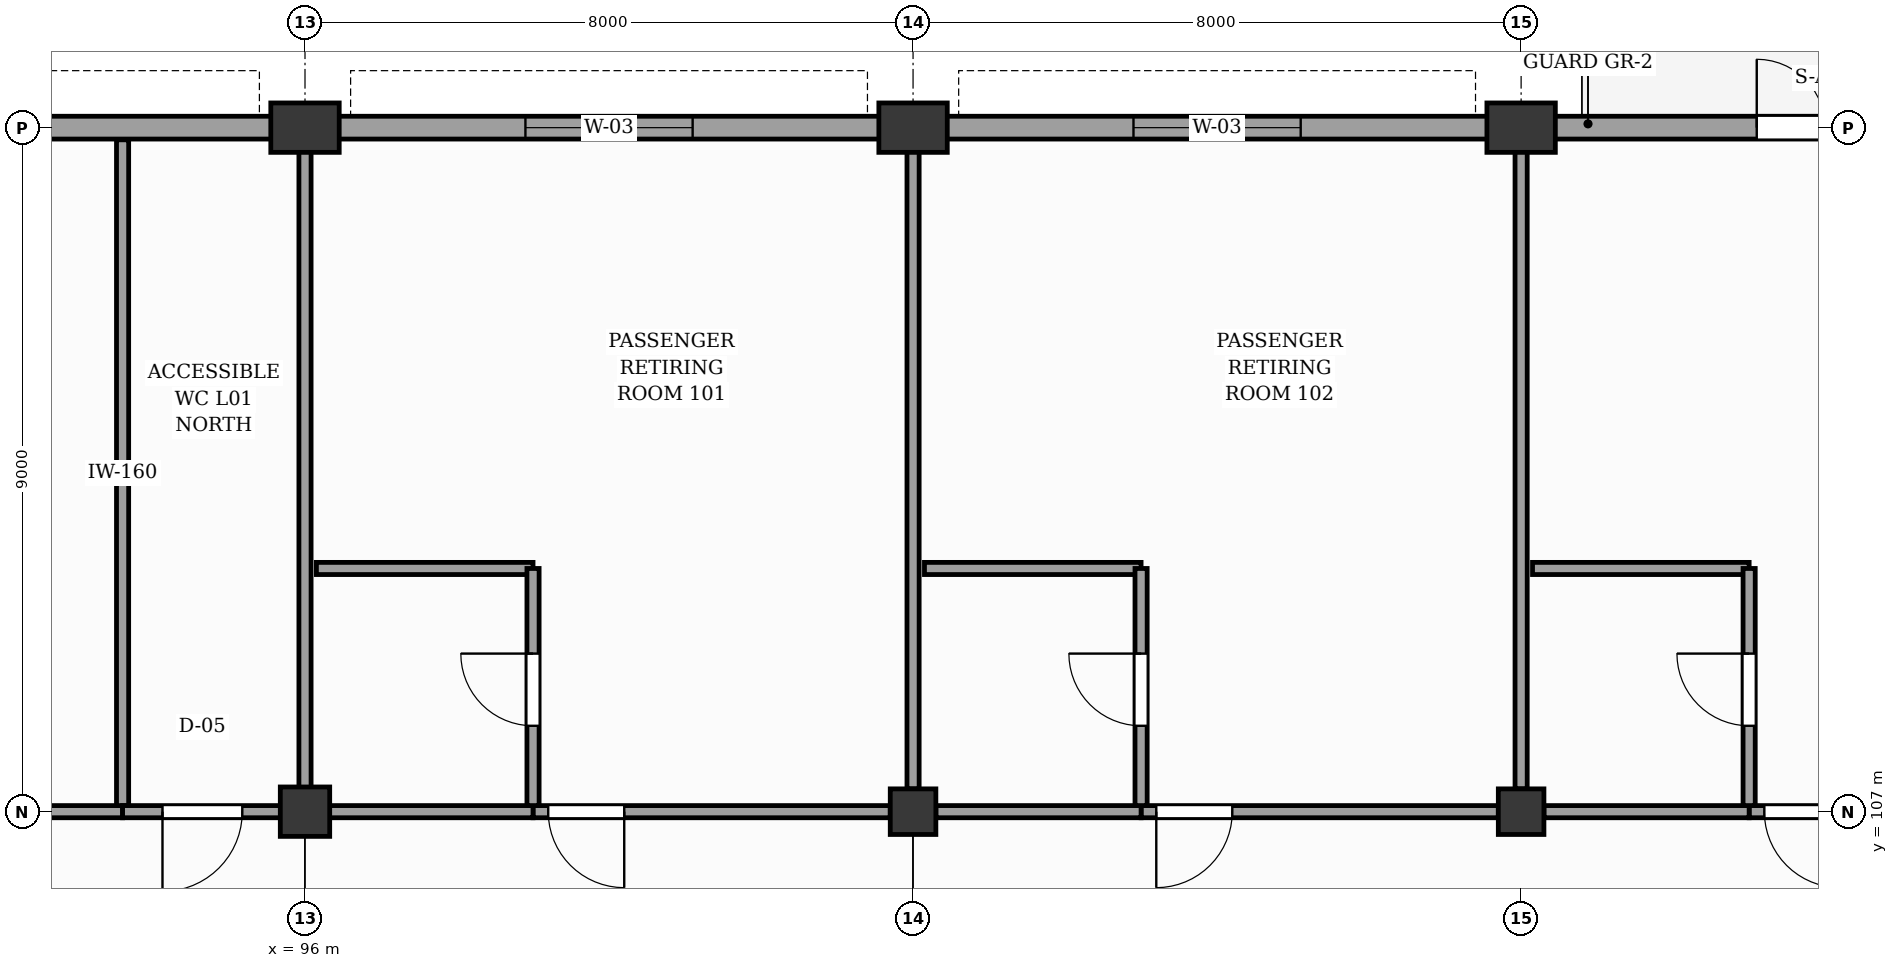
"""IFC4 building model, lengths in metres.
Left out: names, types, materials, properties, quantities, classifications, styles, units other than length and angle.
Written with IfcOpenShell. Run it as: python <this file> out.ifc"""

import sys

from ifc_helpers import new_model, si_unit, direction, frame, frame_2d, origin, origin_2d, place, context, subcontext, project, spatial, rectangle, extrude, element, fill, save


model = new_model("IFC4")
c1 = context("Model", 3, precision=1e-05, world=origin(), true_north=direction((0.0, 1.0)))
c2 = subcontext(c1, "Body", "Model", "MODEL_VIEW")
j1 = project(units=[si_unit("LENGTHUNIT", "METRE"), si_unit("PLANEANGLEUNIT", "RADIAN")], contexts=[c1])
p1 = place(None, origin())
s1 = spatial("IfcSite", under=j1, at=p1, CompositionType="ELEMENT")
p2 = place(p1, origin())
s2 = spatial("IfcBuilding", under=s1, at=p2, CompositionType="ELEMENT")
p3 = place(p2, frame((0.0, 0.0, 4.8)))
s3 = spatial("IfcBuildingStorey", under=s2, at=p3, CompositionType="ELEMENT", Elevation=4.8)
p4 = place(p3, frame((96.0, 107.0, 0.0), z_axis=(0.0, 0.0, 1.0), x_axis=(1.0, 0.0, 0.0)))
e1 = element("IfcColumn", 1, at=p4, inside=s3, PredefinedType="COLUMN", context=c2, shape_type="SweptSolid", body=[
    extrude(rectangle(XDim=0.65, YDim=0.65, at=origin_2d()), origin(), (0.0, 0.0, 1.0), 4.8),
])
p5 = place(p3, frame((96.0, 116.0, 0.0), z_axis=(0.0, 0.0, 1.0), x_axis=(1.0, 0.0, 0.0)))
e2 = element("IfcColumn", 2, at=p5, inside=s3, PredefinedType="PILASTER", context=c2, shape_type="SweptSolid", body=[
    extrude(rectangle(XDim=0.9, YDim=0.65, at=origin_2d()), origin(), (0.0, 0.0, 1.0), 4.8),
])
p6 = place(p3, frame((104.0, 107.0, 0.0), z_axis=(0.0, 0.0, 1.0), x_axis=(1.0, 0.0, 0.0)))
e3 = element("IfcColumn", 3, at=p6, inside=s3, PredefinedType="COLUMN", context=c2, shape_type="SweptSolid", body=[
    extrude(rectangle(XDim=0.6, YDim=0.6, at=origin_2d()), origin(), (0.0, 0.0, 1.0), 4.8),
])
p7 = place(p3, frame((104.0, 116.0, 0.0), z_axis=(0.0, 0.0, 1.0), x_axis=(1.0, 0.0, 0.0)))
e4 = element("IfcColumn", 4, at=p7, inside=s3, PredefinedType="PILASTER", context=c2, shape_type="SweptSolid", body=[
    extrude(rectangle(XDim=0.9, YDim=0.65, at=origin_2d()), origin(), (0.0, 0.0, 1.0), 4.8),
])
p8 = place(p3, frame((112.0, 107.0, 0.0), z_axis=(0.0, 0.0, 1.0), x_axis=(1.0, 0.0, 0.0)))
e5 = element("IfcColumn", 5, at=p8, inside=s3, PredefinedType="COLUMN", context=c2, shape_type="SweptSolid", body=[
    extrude(rectangle(XDim=0.6, YDim=0.6, at=origin_2d()), origin(), (0.0, 0.0, 1.0), 4.8),
])
p9 = place(p3, frame((112.0, 116.0, 0.0), z_axis=(0.0, 0.0, 1.0), x_axis=(1.0, 0.0, 0.0)))
e6 = element("IfcColumn", 6, at=p9, inside=s3, PredefinedType="PILASTER", context=c2, shape_type="SweptSolid", body=[
    extrude(rectangle(XDim=0.9, YDim=0.65, at=origin_2d()), origin(), (0.0, 0.0, 1.0), 4.8),
])
p10 = place(p3, frame((88.4, 116.0, 0.0), z_axis=(0.0, 0.0, 1.0), x_axis=(1.0, 0.0, 0.0)))
e7 = element("IfcWall", 7, at=p10, inside=s3, PredefinedType="SOLIDWALL", context=c2, shape_type="SweptSolid", body=[
    extrude(rectangle(XDim=7.2, YDim=0.3, at=frame_2d((3.6, 0.0))), origin(), (0.0, 0.0, 1.0), 3.84),
])
p11 = place(p10, frame((3.15, 0.0, 0.9)))
e8 = element("IfcOpeningElement", 8, at=p11, cuts=e7, PredefinedType="OPENING", context=c2, shape_type="SweptSolid", body=[
    extrude(rectangle(XDim=0.9, YDim=1.1, at=frame_2d((0.45, 0.55))), frame((0.0, 0.16, 0.0), z_axis=(0.0, -1.0, 0.0), x_axis=(1.0, 0.0, 0.0)), (0.0, 0.0, 1.0), 0.32),
])
p12 = place(p3, frame((96.4, 116.0, 0.0), z_axis=(0.0, 0.0, 1.0), x_axis=(1.0, 0.0, 0.0)))
e9 = element("IfcWall", 9, at=p12, inside=s3, PredefinedType="SOLIDWALL", context=c2, shape_type="SweptSolid", body=[
    extrude(rectangle(XDim=7.2, YDim=0.3, at=frame_2d((3.6, 0.0))), origin(), (0.0, 0.0, 1.0), 3.84),
])
p13 = place(p12, frame((2.5, 0.0, 0.9)))
e10 = element("IfcOpeningElement", 10, at=p13, cuts=e9, PredefinedType="OPENING", context=c2, shape_type="SweptSolid", body=[
    extrude(rectangle(XDim=2.2, YDim=2.2, at=frame_2d((1.1, 1.1))), frame((0.0, 0.16, 0.0), z_axis=(0.0, -1.0, 0.0), x_axis=(1.0, 0.0, 0.0)), (0.0, 0.0, 1.0), 0.32),
])
p14 = place(p3, frame((104.4, 116.0, 0.0), z_axis=(0.0, 0.0, 1.0), x_axis=(1.0, 0.0, 0.0)))
e11 = element("IfcWall", 11, at=p14, inside=s3, PredefinedType="SOLIDWALL", context=c2, shape_type="SweptSolid", body=[
    extrude(rectangle(XDim=7.2, YDim=0.3, at=frame_2d((3.6, 0.0))), origin(), (0.0, 0.0, 1.0), 3.84),
])
p15 = place(p14, frame((2.5, 0.0, 0.9)))
e12 = element("IfcOpeningElement", 12, at=p15, cuts=e11, PredefinedType="OPENING", context=c2, shape_type="SweptSolid", body=[
    extrude(rectangle(XDim=2.2, YDim=2.2, at=frame_2d((1.1, 1.1))), frame((0.0, 0.16, 0.0), z_axis=(0.0, -1.0, 0.0), x_axis=(1.0, 0.0, 0.0)), (0.0, 0.0, 1.0), 0.32),
])
p16 = place(p3, frame((112.4, 116.0, 0.0), z_axis=(0.0, 0.0, 1.0), x_axis=(1.0, 0.0, 0.0)))
e13 = element("IfcWall", 13, at=p16, inside=s3, PredefinedType="SOLIDWALL", context=c2, shape_type="SweptSolid", body=[
    extrude(rectangle(XDim=7.2, YDim=0.3, at=frame_2d((3.6, 0.0))), origin(), (0.0, 0.0, 1.0), 3.18),
])
p17 = place(p16, frame((2.7, 0.0, 0.0)))
e14 = element("IfcOpeningElement", 14, at=p17, cuts=e13, PredefinedType="OPENING", context=c2, shape_type="SweptSolid", body=[
    extrude(rectangle(XDim=1.8, YDim=2.2, at=frame_2d((0.9, 1.1))), frame((0.0, 0.16, 0.0), z_axis=(0.0, -1.0, 0.0), x_axis=(1.0, 0.0, 0.0)), (0.0, 0.0, 1.0), 0.32),
])
p18 = place(p3, frame((90.2, 107.0, 0.0), z_axis=(0.0, 0.0, 1.0), x_axis=(1.0, 0.0, 0.0)))
e15 = element("IfcWall", 15, at=p18, inside=s3, PredefinedType="PARTITIONING", context=c2, shape_type="SweptSolid", body=[
    extrude(rectangle(XDim=3.4, YDim=0.16, at=frame_2d((1.7, 0.0))), origin(), (0.0, 0.0, 1.0), 3.7),
])
p19 = place(p18, frame((1.225, 0.0, 0.0)))
e16 = element("IfcOpeningElement", 16, at=p19, cuts=e15, PredefinedType="OPENING", context=c2, shape_type="SweptSolid", body=[
    extrude(rectangle(XDim=0.95, YDim=2.1, at=frame_2d((0.475, 1.05))), frame((0.0, 0.09, 0.0), z_axis=(0.0, -1.0, 0.0), x_axis=(1.0, 0.0, 0.0)), (0.0, 0.0, 1.0), 0.18),
])
p20 = place(p3, frame((93.6, 107.08, 0.0), z_axis=(0.0, 0.0, 1.0), x_axis=(0.0, 1.0, 0.0)))
e17 = element("IfcWall", 17, at=p20, inside=s3, PredefinedType="PARTITIONING", context=c2, shape_type="SweptSolid", body=[
    extrude(rectangle(XDim=8.76, YDim=0.16, at=frame_2d((4.38, 0.0))), origin(), (0.0, 0.0, 1.0), 3.7),
])
p21 = place(p3, frame((93.6, 107.0, 0.0), z_axis=(0.0, 0.0, 1.0), x_axis=(1.0, 0.0, 0.0)))
e18 = element("IfcWall", 18, at=p21, inside=s3, PredefinedType="PARTITIONING", context=c2, shape_type="SweptSolid", body=[
    extrude(rectangle(XDim=2.1, YDim=0.16, at=frame_2d((1.05, 0.0))), origin(), (0.0, 0.0, 1.0), 3.7),
])
p22 = place(p21, frame((0.525, 0.0, 0.0)))
e19 = element("IfcOpeningElement", 19, at=p22, cuts=e18, PredefinedType="OPENING", context=c2, shape_type="SweptSolid", body=[
    extrude(rectangle(XDim=1.05, YDim=2.1, at=frame_2d((0.525, 1.05))), frame((0.0, 0.09, 0.0), z_axis=(0.0, -1.0, 0.0), x_axis=(1.0, 0.0, 0.0)), (0.0, 0.0, 1.0), 0.18),
])
p23 = place(p3, frame((96.0, 107.3, 0.0), z_axis=(0.0, 0.0, 1.0), x_axis=(0.0, 1.0, 0.0)))
e20 = element("IfcWall", 20, at=p23, inside=s3, PredefinedType="PARTITIONING", context=c2, shape_type="SweptSolid", body=[
    extrude(rectangle(XDim=8.4, YDim=0.16, at=frame_2d((4.2, 0.0))), origin(), (0.0, 0.0, 1.0), 3.7),
])
p24 = place(p3, frame((99.0, 107.0, 0.0), z_axis=(0.0, 0.0, 1.0), x_axis=(1.0, 0.0, 0.0)))
e21 = element("IfcWall", 21, at=p24, inside=s3, PredefinedType="PARTITIONING", context=c2, shape_type="SweptSolid", body=[
    extrude(rectangle(XDim=4.7, YDim=0.16, at=frame_2d((2.35, 0.0))), origin(), (0.0, 0.0, 1.0), 3.7),
])
p25 = place(p24, frame((0.2, 0.0, 0.0)))
e22 = element("IfcOpeningElement", 22, at=p25, cuts=e21, PredefinedType="OPENING", context=c2, shape_type="SweptSolid", body=[
    extrude(rectangle(XDim=1.0, YDim=2.1, at=frame_2d((0.5, 1.05))), frame((0.0, 0.09, 0.0), z_axis=(0.0, -1.0, 0.0), x_axis=(1.0, 0.0, 0.0)), (0.0, 0.0, 1.0), 0.18),
])
p26 = place(p3, frame((104.0, 107.3, 0.0), z_axis=(0.0, 0.0, 1.0), x_axis=(0.0, 1.0, 0.0)))
e23 = element("IfcWall", 23, at=p26, inside=s3, PredefinedType="PARTITIONING", context=c2, shape_type="SweptSolid", body=[
    extrude(rectangle(XDim=8.4, YDim=0.16, at=frame_2d((4.2, 0.0))), origin(), (0.0, 0.0, 1.0), 3.7),
])
p27 = place(p3, frame((96.3, 107.0, 0.0), z_axis=(0.0, 0.0, 1.0), x_axis=(1.0, 0.0, 0.0)))
e24 = element("IfcWall", 24, at=p27, inside=s3, PredefinedType="PARTITIONING", context=c2, shape_type="SweptSolid", body=[
    extrude(rectangle(XDim=2.7, YDim=0.16, at=frame_2d((1.35, 0.0))), origin(), (0.0, 0.0, 1.0), 3.7),
])
p28 = place(p3, frame((96.15, 110.2, 0.0), z_axis=(0.0, 0.0, 1.0), x_axis=(1.0, 0.0, 0.0)))
e25 = element("IfcWall", 25, at=p28, inside=s3, PredefinedType="PARTITIONING", context=c2, shape_type="SweptSolid", body=[
    extrude(rectangle(XDim=2.85, YDim=0.16, at=frame_2d((1.425, 0.0))), origin(), (0.0, 0.0, 1.0), 3.7),
])
p29 = place(p3, frame((99.0, 107.08, 0.0), z_axis=(0.0, 0.0, 1.0), x_axis=(0.0, 1.0, 0.0)))
e26 = element("IfcWall", 26, at=p29, inside=s3, PredefinedType="PARTITIONING", context=c2, shape_type="SweptSolid", body=[
    extrude(rectangle(XDim=3.12, YDim=0.16, at=frame_2d((1.56, 0.0))), origin(), (0.0, 0.0, 1.0), 3.7),
])
p30 = place(p29, frame((1.05, 0.0, 0.0)))
e27 = element("IfcOpeningElement", 27, at=p30, cuts=e26, PredefinedType="OPENING", context=c2, shape_type="SweptSolid", body=[
    extrude(rectangle(XDim=0.95, YDim=2.1, at=frame_2d((0.475, 1.05))), frame((0.0, 0.09, 0.0), z_axis=(0.0, -1.0, 0.0), x_axis=(1.0, 0.0, 0.0)), (0.0, 0.0, 1.0), 0.18),
])
p31 = place(p3, frame((107.0, 107.0, 0.0), z_axis=(0.0, 0.0, 1.0), x_axis=(1.0, 0.0, 0.0)))
e28 = element("IfcWall", 28, at=p31, inside=s3, PredefinedType="PARTITIONING", context=c2, shape_type="SweptSolid", body=[
    extrude(rectangle(XDim=4.7, YDim=0.16, at=frame_2d((2.35, 0.0))), origin(), (0.0, 0.0, 1.0), 3.7),
])
p32 = place(p31, frame((0.2, 0.0, 0.0)))
e29 = element("IfcOpeningElement", 29, at=p32, cuts=e28, PredefinedType="OPENING", context=c2, shape_type="SweptSolid", body=[
    extrude(rectangle(XDim=1.0, YDim=2.1, at=frame_2d((0.5, 1.05))), frame((0.0, 0.09, 0.0), z_axis=(0.0, -1.0, 0.0), x_axis=(1.0, 0.0, 0.0)), (0.0, 0.0, 1.0), 0.18),
])
p33 = place(p3, frame((112.0, 107.3, 0.0), z_axis=(0.0, 0.0, 1.0), x_axis=(0.0, 1.0, 0.0)))
e30 = element("IfcWall", 30, at=p33, inside=s3, PredefinedType="PARTITIONING", context=c2, shape_type="SweptSolid", body=[
    extrude(rectangle(XDim=8.4, YDim=0.16, at=frame_2d((4.2, 0.0))), origin(), (0.0, 0.0, 1.0), 3.7),
])
p34 = place(p3, frame((104.3, 107.0, 0.0), z_axis=(0.0, 0.0, 1.0), x_axis=(1.0, 0.0, 0.0)))
e31 = element("IfcWall", 31, at=p34, inside=s3, PredefinedType="PARTITIONING", context=c2, shape_type="SweptSolid", body=[
    extrude(rectangle(XDim=2.7, YDim=0.16, at=frame_2d((1.35, 0.0))), origin(), (0.0, 0.0, 1.0), 3.7),
])
p35 = place(p3, frame((104.15, 110.2, 0.0), z_axis=(0.0, 0.0, 1.0), x_axis=(1.0, 0.0, 0.0)))
e32 = element("IfcWall", 32, at=p35, inside=s3, PredefinedType="PARTITIONING", context=c2, shape_type="SweptSolid", body=[
    extrude(rectangle(XDim=2.85, YDim=0.16, at=frame_2d((1.425, 0.0))), origin(), (0.0, 0.0, 1.0), 3.7),
])
p36 = place(p3, frame((107.0, 107.08, 0.0), z_axis=(0.0, 0.0, 1.0), x_axis=(0.0, 1.0, 0.0)))
e33 = element("IfcWall", 33, at=p36, inside=s3, PredefinedType="PARTITIONING", context=c2, shape_type="SweptSolid", body=[
    extrude(rectangle(XDim=3.12, YDim=0.16, at=frame_2d((1.56, 0.0))), origin(), (0.0, 0.0, 1.0), 3.7),
])
p37 = place(p36, frame((1.05, 0.0, 0.0)))
e34 = element("IfcOpeningElement", 34, at=p37, cuts=e33, PredefinedType="OPENING", context=c2, shape_type="SweptSolid", body=[
    extrude(rectangle(XDim=0.95, YDim=2.1, at=frame_2d((0.475, 1.05))), frame((0.0, 0.09, 0.0), z_axis=(0.0, -1.0, 0.0), x_axis=(1.0, 0.0, 0.0)), (0.0, 0.0, 1.0), 0.18),
])
p38 = place(p3, frame((115.0, 107.0, 0.0), z_axis=(0.0, 0.0, 1.0), x_axis=(1.0, 0.0, 0.0)))
e35 = element("IfcWall", 35, at=p38, inside=s3, PredefinedType="PARTITIONING", context=c2, shape_type="SweptSolid", body=[
    extrude(rectangle(XDim=4.7, YDim=0.16, at=frame_2d((2.35, 0.0))), origin(), (0.0, 0.0, 1.0), 2.98),
])
p39 = place(p38, frame((0.2, 0.0, 0.0)))
e36 = element("IfcOpeningElement", 36, at=p39, cuts=e35, PredefinedType="OPENING", context=c2, shape_type="SweptSolid", body=[
    extrude(rectangle(XDim=1.0, YDim=2.1, at=frame_2d((0.5, 1.05))), frame((0.0, 0.09, 0.0), z_axis=(0.0, -1.0, 0.0), x_axis=(1.0, 0.0, 0.0)), (0.0, 0.0, 1.0), 0.18),
])
p40 = place(p3, frame((112.3, 107.0, 0.0), z_axis=(0.0, 0.0, 1.0), x_axis=(1.0, 0.0, 0.0)))
e37 = element("IfcWall", 37, at=p40, inside=s3, PredefinedType="PARTITIONING", context=c2, shape_type="SweptSolid", body=[
    extrude(rectangle(XDim=2.7, YDim=0.16, at=frame_2d((1.35, 0.0))), origin(), (0.0, 0.0, 1.0), 3.7),
])
p41 = place(p3, frame((112.15, 110.2, 0.0), z_axis=(0.0, 0.0, 1.0), x_axis=(1.0, 0.0, 0.0)))
e38 = element("IfcWall", 38, at=p41, inside=s3, PredefinedType="PARTITIONING", context=c2, shape_type="SweptSolid", body=[
    extrude(rectangle(XDim=2.85, YDim=0.16, at=frame_2d((1.425, 0.0))), origin(), (0.0, 0.0, 1.0), 3.7),
])
p42 = place(p3, frame((115.0, 107.08, 0.0), z_axis=(0.0, 0.0, 1.0), x_axis=(0.0, 1.0, 0.0)))
e39 = element("IfcWall", 39, at=p42, inside=s3, PredefinedType="PARTITIONING", context=c2, shape_type="SweptSolid", body=[
    extrude(rectangle(XDim=3.12, YDim=0.16, at=frame_2d((1.56, 0.0))), origin(), (0.0, 0.0, 1.0), 3.7),
])
p43 = place(p42, frame((1.05, 0.0, 0.0)))
e40 = element("IfcOpeningElement", 40, at=p43, cuts=e39, PredefinedType="OPENING", context=c2, shape_type="SweptSolid", body=[
    extrude(rectangle(XDim=0.95, YDim=2.1, at=frame_2d((0.475, 1.05))), frame((0.0, 0.09, 0.0), z_axis=(0.0, -1.0, 0.0), x_axis=(1.0, 0.0, 0.0)), (0.0, 0.0, 1.0), 0.18),
])
p44 = place(p13, origin())
e41 = element("IfcWindow", 41, at=p44, inside=s3, PartitioningType="SINGLE_PANEL", PredefinedType="WINDOW", context=c2, shape_type="SweptSolid", body=[
    extrude(rectangle(XDim=2.2, YDim=2.2, at=frame_2d((1.1, 1.1))), frame((0.0, 0.03, 0.0), z_axis=(0.0, -1.0, 0.0), x_axis=(1.0, 0.0, 0.0)), (0.0, 0.0, 1.0), 0.06),
])
fill(e10, e41)
p45 = place(p15, origin())
e42 = element("IfcWindow", 42, at=p45, inside=s3, PartitioningType="SINGLE_PANEL", PredefinedType="WINDOW", context=c2, shape_type="SweptSolid", body=[
    extrude(rectangle(XDim=2.2, YDim=2.2, at=frame_2d((1.1, 1.1))), frame((0.0, 0.03, 0.0), z_axis=(0.0, -1.0, 0.0), x_axis=(1.0, 0.0, 0.0)), (0.0, 0.0, 1.0), 0.06),
])
fill(e12, e42)
p46 = place(p17, origin())
e43 = element("IfcDoor", 43, at=p46, inside=s3, OperationType="DOUBLE_DOOR_SINGLE_SWING", PredefinedType="DOOR", context=c2, shape_type="SweptSolid", body=[
    extrude(rectangle(XDim=1.8, YDim=2.2, at=frame_2d((0.9, 1.1))), frame((0.0, 0.025, 0.0), z_axis=(0.0, -1.0, 0.0), x_axis=(1.0, 0.0, 0.0)), (0.0, 0.0, 1.0), 0.05),
])
fill(e14, e43)
p47 = place(p22, frame((1.05, 0.0, 0.0), z_axis=(0.0, 0.0, 1.0), x_axis=(-1.0, 0.0, 0.0)))
e44 = element("IfcDoor", 44, at=p47, inside=s3, OperationType="SINGLE_SWING_LEFT", PredefinedType="DOOR", context=c2, shape_type="SweptSolid", body=[
    extrude(rectangle(XDim=1.05, YDim=2.1, at=frame_2d((0.525, 1.05))), frame((0.0, 0.025, 0.0), z_axis=(0.0, -1.0, 0.0), x_axis=(1.0, 0.0, 0.0)), (0.0, 0.0, 1.0), 0.05),
])
fill(e19, e44)
p48 = place(p25, frame((1.0, 0.0, 0.0), z_axis=(0.0, 0.0, 1.0), x_axis=(-1.0, 0.0, 0.0)))
e45 = element("IfcDoor", 45, at=p48, inside=s3, OperationType="SINGLE_SWING_RIGHT", PredefinedType="DOOR", context=c2, shape_type="SweptSolid", body=[
    extrude(rectangle(XDim=1.0, YDim=2.1, at=frame_2d((0.5, 1.05))), frame((0.0, 0.025, 0.0), z_axis=(0.0, -1.0, 0.0), x_axis=(1.0, 0.0, 0.0)), (0.0, 0.0, 1.0), 0.05),
])
fill(e22, e45)
p49 = place(p30, origin())
e46 = element("IfcDoor", 46, at=p49, inside=s3, OperationType="SINGLE_SWING_RIGHT", PredefinedType="DOOR", context=c2, shape_type="SweptSolid", body=[
    extrude(rectangle(XDim=0.95, YDim=2.1, at=frame_2d((0.475, 1.05))), frame((0.0, 0.025, 0.0), z_axis=(0.0, -1.0, 0.0), x_axis=(1.0, 0.0, 0.0)), (0.0, 0.0, 1.0), 0.05),
])
fill(e27, e46)
p50 = place(p32, frame((1.0, 0.0, 0.0), z_axis=(0.0, 0.0, 1.0), x_axis=(-1.0, 0.0, 0.0)))
e47 = element("IfcDoor", 47, at=p50, inside=s3, OperationType="SINGLE_SWING_LEFT", PredefinedType="DOOR", context=c2, shape_type="SweptSolid", body=[
    extrude(rectangle(XDim=1.0, YDim=2.1, at=frame_2d((0.5, 1.05))), frame((0.0, 0.025, 0.0), z_axis=(0.0, -1.0, 0.0), x_axis=(1.0, 0.0, 0.0)), (0.0, 0.0, 1.0), 0.05),
])
fill(e29, e47)
p51 = place(p37, origin())
e48 = element("IfcDoor", 48, at=p51, inside=s3, OperationType="SINGLE_SWING_RIGHT", PredefinedType="DOOR", context=c2, shape_type="SweptSolid", body=[
    extrude(rectangle(XDim=0.95, YDim=2.1, at=frame_2d((0.475, 1.05))), frame((0.0, 0.025, 0.0), z_axis=(0.0, -1.0, 0.0), x_axis=(1.0, 0.0, 0.0)), (0.0, 0.0, 1.0), 0.05),
])
fill(e34, e48)
p52 = place(p39, frame((1.0, 0.0, 0.0), z_axis=(0.0, 0.0, 1.0), x_axis=(-1.0, 0.0, 0.0)))
e49 = element("IfcDoor", 49, at=p52, inside=s3, OperationType="SINGLE_SWING_RIGHT", PredefinedType="DOOR", context=c2, shape_type="SweptSolid", body=[
    extrude(rectangle(XDim=1.0, YDim=2.1, at=frame_2d((0.5, 1.05))), frame((0.0, 0.025, 0.0), z_axis=(0.0, -1.0, 0.0), x_axis=(1.0, 0.0, 0.0)), (0.0, 0.0, 1.0), 0.05),
])
fill(e36, e49)
p53 = place(p43, origin())
e50 = element("IfcDoor", 50, at=p53, inside=s3, OperationType="SINGLE_SWING_RIGHT", PredefinedType="DOOR", context=c2, shape_type="SweptSolid", body=[
    extrude(rectangle(XDim=0.95, YDim=2.1, at=frame_2d((0.475, 1.05))), frame((0.0, 0.025, 0.0), z_axis=(0.0, -1.0, 0.0), x_axis=(1.0, 0.0, 0.0)), (0.0, 0.0, 1.0), 0.05),
])
fill(e40, e50)
save(model, sys.argv[1])
